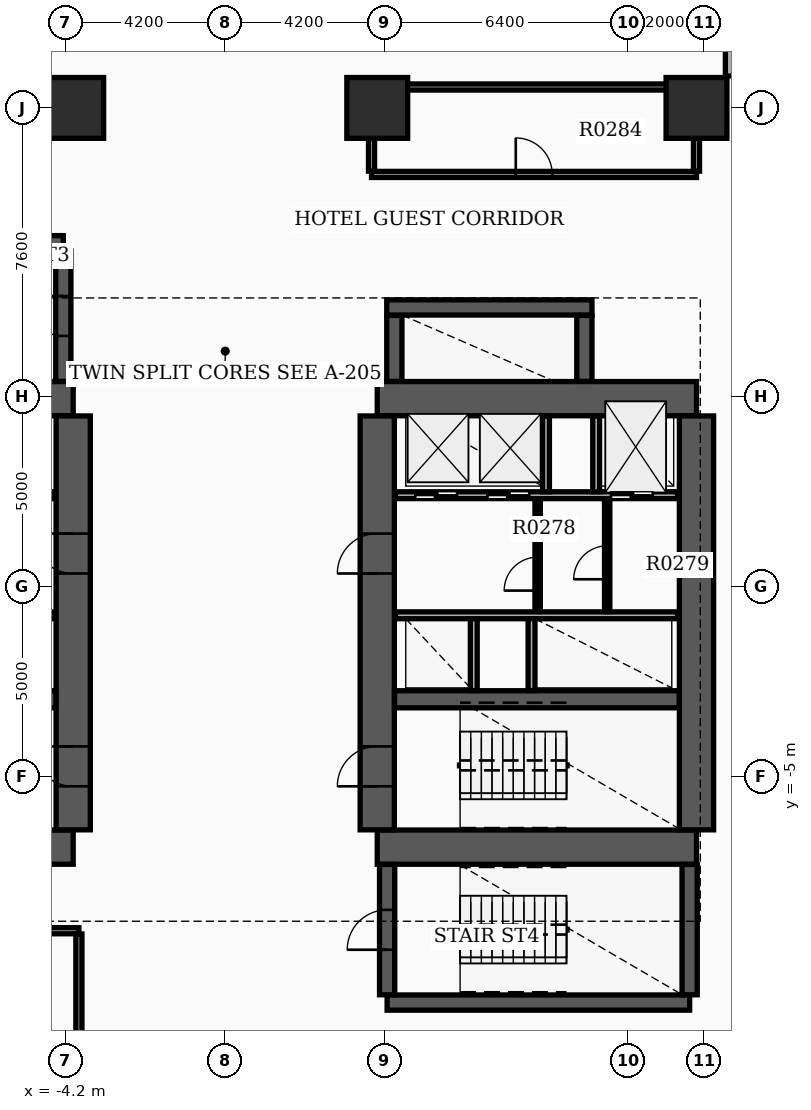
"""IFC4 building model, lengths in metres.
Left out: names, types, materials, properties, quantities, classifications, styles, units other than length and angle.
Written with IfcOpenShell. Run it as: python <this file> out.ifc"""

import sys

from ifc_helpers import new_model, si_unit, direction, frame, frame_2d, origin, origin_2d, place, context, subcontext, project, spatial, rectangle, extrude, element, fill, save


model = new_model("IFC4")
c1 = context("Model", 3, precision=1e-05, world=origin(), true_north=direction((0.0, 1.0)))
c2 = subcontext(c1, "Body", "Model", "MODEL_VIEW")
j1 = project(units=[si_unit("LENGTHUNIT", "METRE"), si_unit("PLANEANGLEUNIT", "RADIAN")], contexts=[c1])
p1 = place(None, origin())
s1 = spatial("IfcSite", under=j1, at=p1, CompositionType="ELEMENT")
p2 = place(p1, origin())
s2 = spatial("IfcBuilding", under=s1, at=p2, CompositionType="ELEMENT")
p3 = place(p2, frame((0.0, 0.0, 23.7)))
s3 = spatial("IfcBuildingStorey", under=s2, at=p3, CompositionType="ELEMENT", Elevation=23.7)
for number, where, z_axis, x_axis in (
    (1, (-12.4, -6.85, 0.0), (0.0, 0.0, 1.0), (1.0, 0.0, 0.0)),
    (2, (-12.4, 4.95, 0.0), (0.0, 0.0, 1.0), (1.0, 0.0, 0.0)),
):
    element("IfcWall", number, at=place(p3, frame(where, z_axis=z_axis, x_axis=x_axis)), inside=s3, PredefinedType="SHEAR", context=c2, shape_type="SweptSolid", body=[
        extrude(rectangle(XDim=8.4, YDim=0.9, at=frame_2d((4.2, 0.0))), origin(), (0.0, 0.0, 1.0), 3.7),
    ])
p4 = place(p3, frame((-4.0, -6.395, 0.0), z_axis=(0.0, 0.0, 1.0), x_axis=(0.0, 1.0, 0.0)))
e3 = element("IfcWall", 3, at=p4, inside=s3, PredefinedType="SHEAR", context=c2, shape_type="SweptSolid", body=[
    extrude(rectangle(XDim=10.89, YDim=0.9, at=frame_2d((5.445, 0.0))), origin(), (0.0, 0.0, 1.0), 3.7),
])
p5 = place(p4, frame((1.145, 0.0, 0.0)))
e4 = element("IfcOpeningElement", 4, at=p5, cuts=e3, PredefinedType="OPENING", context=c2, shape_type="SweptSolid", body=[
    extrude(rectangle(XDim=1.05, YDim=2.15, at=frame_2d((0.525, 1.075))), frame((0.0, 0.46, 0.0), z_axis=(0.0, -1.0, 0.0), x_axis=(1.0, 0.0, 0.0)), (0.0, 0.0, 1.0), 0.92),
])
p6 = place(p4, frame((6.745, 0.0, 0.0)))
e5 = element("IfcOpeningElement", 5, at=p6, cuts=e3, PredefinedType="OPENING", context=c2, shape_type="SweptSolid", body=[
    extrude(rectangle(XDim=1.05, YDim=2.15, at=frame_2d((0.525, 1.075))), frame((0.0, 0.46, 0.0), z_axis=(0.0, -1.0, 0.0), x_axis=(1.0, 0.0, 0.0)), (0.0, 0.0, 1.0), 0.92),
])
p7 = place(p3, frame((-11.945, -2.96, 0.0), z_axis=(0.0, 0.0, 1.0), x_axis=(1.0, 0.0, 0.0)))
e6 = element("IfcWall", 6, at=p7, inside=s3, PredefinedType="SHEAR", context=c2, shape_type="SweptSolid", body=[
    extrude(rectangle(XDim=7.49, YDim=0.45, at=frame_2d((3.745, 0.0))), origin(), (0.0, 0.0, 1.0), 3.7),
])
for number, where, z_axis, x_axis in (
    (7, (4.0, -6.85, 0.0), (0.0, 0.0, 1.0), (1.0, 0.0, 0.0)),
    (8, (4.0, 4.95, 0.0), (0.0, 0.0, 1.0), (1.0, 0.0, 0.0)),
):
    element("IfcWall", number, at=place(p3, frame(where, z_axis=z_axis, x_axis=x_axis)), inside=s3, PredefinedType="SHEAR", context=c2, shape_type="SweptSolid", body=[
        extrude(rectangle(XDim=8.4, YDim=0.9, at=frame_2d((4.2, 0.0))), origin(), (0.0, 0.0, 1.0), 3.7),
    ])
p8 = place(p3, frame((4.0, -6.395, 0.0), z_axis=(0.0, 0.0, 1.0), x_axis=(0.0, 1.0, 0.0)))
e9 = element("IfcWall", 9, at=p8, inside=s3, PredefinedType="SHEAR", context=c2, shape_type="SweptSolid", body=[
    extrude(rectangle(XDim=10.89, YDim=0.9, at=frame_2d((5.445, 0.0))), origin(), (0.0, 0.0, 1.0), 3.7),
])
p9 = place(p8, frame((1.145, 0.0, 0.0)))
e10 = element("IfcOpeningElement", 10, at=p9, cuts=e9, PredefinedType="OPENING", context=c2, shape_type="SweptSolid", body=[
    extrude(rectangle(XDim=1.05, YDim=2.15, at=frame_2d((0.525, 1.075))), frame((0.0, 0.46, 0.0), z_axis=(0.0, -1.0, 0.0), x_axis=(1.0, 0.0, 0.0)), (0.0, 0.0, 1.0), 0.92),
])
p10 = place(p8, frame((6.745, 0.0, 0.0)))
e11 = element("IfcOpeningElement", 11, at=p10, cuts=e9, PredefinedType="OPENING", context=c2, shape_type="SweptSolid", body=[
    extrude(rectangle(XDim=1.05, YDim=2.15, at=frame_2d((0.525, 1.075))), frame((0.0, 0.46, 0.0), z_axis=(0.0, -1.0, 0.0), x_axis=(1.0, 0.0, 0.0)), (0.0, 0.0, 1.0), 0.92),
])
p11 = place(p3, frame((12.4, -6.395, 0.0), z_axis=(0.0, 0.0, 1.0), x_axis=(0.0, 1.0, 0.0)))
e12 = element("IfcWall", 12, at=p11, inside=s3, PredefinedType="SHEAR", context=c2, shape_type="SweptSolid", body=[
    extrude(rectangle(XDim=10.89, YDim=0.9, at=frame_2d((5.445, 0.0))), origin(), (0.0, 0.0, 1.0), 3.7),
])
p12 = place(p3, frame((4.455, -2.96, 0.0), z_axis=(0.0, 0.0, 1.0), x_axis=(1.0, 0.0, 0.0)))
e13 = element("IfcWall", 13, at=p12, inside=s3, PredefinedType="SHEAR", context=c2, shape_type="SweptSolid", body=[
    extrude(rectangle(XDim=7.49, YDim=0.45, at=frame_2d((3.745, 0.0))), origin(), (0.0, 0.0, 1.0), 3.7),
])
p13 = place(p3, frame((-12.22, 9.04, 0.0), z_axis=(0.0, 0.0, 1.0), x_axis=(1.0, 0.0, 0.0)))
e14 = element("IfcWall", 14, at=p13, inside=s3, PredefinedType="SHEAR", context=c2, shape_type="SweptSolid", body=[
    extrude(rectangle(XDim=7.96, YDim=0.4, at=frame_2d((3.98, 0.0))), origin(), (0.0, 0.0, 1.0), 3.7),
])
p14 = place(p3, frame((-4.26, 5.405, 0.0), z_axis=(0.0, 0.0, 1.0), x_axis=(0.0, 1.0, 0.0)))
e15 = element("IfcWall", 15, at=p14, inside=s3, PredefinedType="SHEAR", context=c2, shape_type="SweptSolid", body=[
    extrude(rectangle(XDim=3.43, YDim=0.4, at=frame_2d((1.715, 0.0))), origin(), (0.0, 0.0, 1.0), 3.7),
])
p15 = place(p14, frame((1.195, 0.0, 0.0)))
e16 = element("IfcOpeningElement", 16, at=p15, cuts=e15, PredefinedType="OPENING", context=c2, shape_type="SweptSolid", body=[
    extrude(rectangle(XDim=1.05, YDim=2.15, at=frame_2d((0.525, 1.075))), frame((0.0, 0.21, 0.0), z_axis=(0.0, -1.0, 0.0), x_axis=(1.0, 0.0, 0.0)), (0.0, 0.0, 1.0), 0.42),
])
p16 = place(p3, frame((4.26, -10.94, 0.0), z_axis=(0.0, 0.0, 1.0), x_axis=(1.0, 0.0, 0.0)))
e17 = element("IfcWall", 17, at=p16, inside=s3, PredefinedType="SHEAR", context=c2, shape_type="SweptSolid", body=[
    extrude(rectangle(XDim=7.96, YDim=0.4, at=frame_2d((3.98, 0.0))), origin(), (0.0, 0.0, 1.0), 3.7),
])
p17 = place(p3, frame((4.26, -10.735, 0.0), z_axis=(0.0, 0.0, 1.0), x_axis=(0.0, 1.0, 0.0)))
e18 = element("IfcWall", 18, at=p17, inside=s3, PredefinedType="SHEAR", context=c2, shape_type="SweptSolid", body=[
    extrude(rectangle(XDim=3.43, YDim=0.4, at=frame_2d((1.715, 0.0))), origin(), (0.0, 0.0, 1.0), 3.7),
])
p18 = place(p17, frame((1.185, 0.0, 0.0)))
e19 = element("IfcOpeningElement", 19, at=p18, cuts=e18, PredefinedType="OPENING", context=c2, shape_type="SweptSolid", body=[
    extrude(rectangle(XDim=1.05, YDim=2.15, at=frame_2d((0.525, 1.075))), frame((0.0, 0.21, 0.0), z_axis=(0.0, -1.0, 0.0), x_axis=(1.0, 0.0, 0.0)), (0.0, 0.0, 1.0), 0.42),
])
p19 = place(p3, frame((12.22, -10.735, 0.0), z_axis=(0.0, 0.0, 1.0), x_axis=(0.0, 1.0, 0.0)))
e20 = element("IfcWall", 20, at=p19, inside=s3, PredefinedType="SHEAR", context=c2, shape_type="SweptSolid", body=[
    extrude(rectangle(XDim=3.43, YDim=0.4, at=frame_2d((1.715, 0.0))), origin(), (0.0, 0.0, 1.0), 3.7),
])
p20 = place(p3, frame((4.45, 5.405, 0.0), z_axis=(0.0, 0.0, 1.0), x_axis=(0.0, 1.0, 0.0)))
e21 = element("IfcWall", 21, at=p20, inside=s3, PredefinedType="SHEAR", context=c2, shape_type="SweptSolid", body=[
    extrude(rectangle(XDim=1.735, YDim=0.4, at=frame_2d((0.867, 0.0))), origin(), (0.0, 0.0, 1.0), 3.7),
])
p21 = place(p3, frame((4.25, 7.35, 0.0), z_axis=(0.0, 0.0, 1.0), x_axis=(1.0, 0.0, 0.0)))
e22 = element("IfcWall", 22, at=p21, inside=s3, PredefinedType="SHEAR", context=c2, shape_type="SweptSolid", body=[
    extrude(rectangle(XDim=5.4, YDim=0.4, at=frame_2d((2.7, 0.0))), origin(), (0.0, 0.0, 1.0), 3.7),
])
p22 = place(p3, frame((9.45, 5.405, 0.0), z_axis=(0.0, 0.0, 1.0), x_axis=(0.0, 1.0, 0.0)))
e23 = element("IfcWall", 23, at=p22, inside=s3, PredefinedType="SHEAR", context=c2, shape_type="SweptSolid", body=[
    extrude(rectangle(XDim=1.735, YDim=0.4, at=frame_2d((0.867, 0.0))), origin(), (0.0, 0.0, 1.0), 3.7),
])
for number, where, z_axis, x_axis in (
    (24, (12.4, 12.6, 0.0), (0.0, 0.0, 1.0), (1.0, 0.0, 0.0)),
    (25, (4.0, 12.6, 0.0), (0.0, 0.0, 1.0), (1.0, 0.0, 0.0)),
    (26, (-4.0, 12.6, 0.0), (0.0, 0.0, 1.0), (1.0, 0.0, 0.0)),
):
    element("IfcColumn", number, at=place(p3, frame(where, z_axis=z_axis, x_axis=x_axis)), inside=s3, PredefinedType="COLUMN", context=c2, shape_type="SweptSolid", body=[
        extrude(rectangle(XDim=1.6, YDim=1.6, at=origin_2d()), origin(), (0.0, 0.0, 1.0), 3.9),
    ])
p23 = place(p3, frame((13.3, 13.44, 0.0), z_axis=(0.0, 0.0, 1.0), x_axis=(0.0, 1.0, 0.0)))
e27 = element("IfcWall", 27, at=p23, inside=s3, PredefinedType="STANDARD", context=c2, shape_type="SweptSolid", body=[
    extrude(rectangle(XDim=1.5, YDim=0.28, at=frame_2d((0.75, 0.0))), origin(), (0.0, 0.0, 1.0), 2.91),
])
p24 = place(p3, frame((-11.9, 2.41, 0.0), z_axis=(0.0, 0.0, 1.0), x_axis=(1.0, 0.0, 0.0)))
e28 = element("IfcWall", 28, at=p24, inside=s3, PredefinedType="SOLIDWALL", context=c2, shape_type="SweptSolid", body=[
    extrude(rectangle(XDim=7.42, YDim=0.18, at=frame_2d((3.71, 0.0))), origin(), (0.0, 0.0, 1.0), 2.9),
])
p25 = place(p24, frame((0.55, 0.0, 0.0)))
e29 = element("IfcOpeningElement", 29, at=p25, cuts=e28, PredefinedType="OPENING", context=c2, shape_type="SweptSolid", body=[
    extrude(rectangle(XDim=1.1, YDim=2.15, at=frame_2d((0.55, 1.075))), frame((0.0, 0.1, 0.0), z_axis=(0.0, -1.0, 0.0), x_axis=(1.0, 0.0, 0.0)), (0.0, 0.0, 1.0), 0.2),
])
p26 = place(p24, frame((3.85, 0.0, 0.0)))
e30 = element("IfcOpeningElement", 30, at=p26, cuts=e28, PredefinedType="OPENING", context=c2, shape_type="SweptSolid", body=[
    extrude(rectangle(XDim=1.1, YDim=2.15, at=frame_2d((0.55, 1.075))), frame((0.0, 0.1, 0.0), z_axis=(0.0, -1.0, 0.0), x_axis=(1.0, 0.0, 0.0)), (0.0, 0.0, 1.0), 0.2),
])
p27 = place(p24, frame((5.75, 0.0, 0.0)))
e31 = element("IfcOpeningElement", 31, at=p27, cuts=e28, PredefinedType="OPENING", context=c2, shape_type="SweptSolid", body=[
    extrude(rectangle(XDim=1.1, YDim=2.15, at=frame_2d((0.55, 1.075))), frame((0.0, 0.1, 0.0), z_axis=(0.0, -1.0, 0.0), x_axis=(1.0, 0.0, 0.0)), (0.0, 0.0, 1.0), 0.2),
])
p28 = place(p3, frame((4.48, 2.41, 0.0), z_axis=(0.0, 0.0, 1.0), x_axis=(1.0, 0.0, 0.0)))
e32 = element("IfcWall", 32, at=p28, inside=s3, PredefinedType="SOLIDWALL", context=c2, shape_type="SweptSolid", body=[
    extrude(rectangle(XDim=7.42, YDim=0.18, at=frame_2d((3.71, 0.0))), origin(), (0.0, 0.0, 1.0), 2.9),
])
p29 = place(p28, frame((5.67, 0.0, 0.0)))
e33 = element("IfcOpeningElement", 33, at=p29, cuts=e32, PredefinedType="OPENING", context=c2, shape_type="SweptSolid", body=[
    extrude(rectangle(XDim=1.1, YDim=2.15, at=frame_2d((0.55, 1.075))), frame((0.0, 0.1, 0.0), z_axis=(0.0, -1.0, 0.0), x_axis=(1.0, 0.0, 0.0)), (0.0, 0.0, 1.0), 0.2),
])
p30 = place(p28, frame((0.52, 0.0, 0.0)))
e34 = element("IfcOpeningElement", 34, at=p30, cuts=e32, PredefinedType="OPENING", context=c2, shape_type="SweptSolid", body=[
    extrude(rectangle(XDim=1.1, YDim=2.15, at=frame_2d((0.55, 1.075))), frame((0.0, 0.1, 0.0), z_axis=(0.0, -1.0, 0.0), x_axis=(1.0, 0.0, 0.0)), (0.0, 0.0, 1.0), 0.2),
])
p31 = place(p28, frame((2.42, 0.0, 0.0)))
e35 = element("IfcOpeningElement", 35, at=p31, cuts=e32, PredefinedType="OPENING", context=c2, shape_type="SweptSolid", body=[
    extrude(rectangle(XDim=1.1, YDim=2.15, at=frame_2d((0.55, 1.075))), frame((0.0, 0.1, 0.0), z_axis=(0.0, -1.0, 0.0), x_axis=(1.0, 0.0, 0.0)), (0.0, 0.0, 1.0), 0.2),
])
for number, where, z_axis, x_axis in (
    (36, (-11.9, -0.75, 0.0), (0.0, 0.0, 1.0), (1.0, 0.0, 0.0)),
    (37, (4.48, -0.75, 0.0), (0.0, 0.0, 1.0), (1.0, 0.0, 0.0)),
):
    element("IfcWall", number, at=place(p3, frame(where, z_axis=z_axis, x_axis=x_axis)), inside=s3, PredefinedType="SOLIDWALL", context=c2, shape_type="SweptSolid", body=[
        extrude(rectangle(XDim=7.42, YDim=0.18, at=frame_2d((3.71, 0.0))), origin(), (0.0, 0.0, 1.0), 2.9),
    ])
for number, where, z_axis, x_axis in (
    (38, (8.44, 2.5, 0.0), (0.0, 0.0, 1.0), (0.0, 1.0, 0.0)),
    (39, (9.76, 2.5, 0.0), (0.0, 0.0, 1.0), (0.0, 1.0, 0.0)),
):
    element("IfcWall", number, at=place(p3, frame(where, z_axis=z_axis, x_axis=x_axis)), inside=s3, PredefinedType="SOLIDWALL", context=c2, shape_type="SweptSolid", body=[
        extrude(rectangle(XDim=1.99, YDim=0.18, at=frame_2d((0.995, 0.0))), origin(), (0.0, 0.0, 1.0), 2.9),
    ])
for number, where, z_axis, x_axis in (
    (40, (6.54, -2.73, 0.0), (0.0, 0.0, 1.0), (0.0, 1.0, 0.0)),
    (41, (8.06, -2.73, 0.0), (0.0, 0.0, 1.0), (0.0, 1.0, 0.0)),
):
    element("IfcWall", number, at=place(p3, frame(where, z_axis=z_axis, x_axis=x_axis)), inside=s3, PredefinedType="SOLIDWALL", context=c2, shape_type="SweptSolid", body=[
        extrude(rectangle(XDim=1.89, YDim=0.18, at=frame_2d((0.945, 0.0))), origin(), (0.0, 0.0, 1.0), 2.9),
    ])
p32 = place(p3, frame((8.22, -0.65, 0.0), z_axis=(0.0, 0.0, 1.0), x_axis=(0.0, 1.0, 0.0)))
e42 = element("IfcWall", 42, at=p32, inside=s3, PredefinedType="SOLIDWALL", context=c2, shape_type="SweptSolid", body=[
    extrude(rectangle(XDim=2.96, YDim=0.14, at=frame_2d((1.48, 0.0))), origin(), (0.0, 0.0, 1.0), 2.9),
])
p33 = place(p32, frame((0.55, 0.0, 0.0)))
e43 = element("IfcOpeningElement", 43, at=p33, cuts=e42, PredefinedType="OPENING", context=c2, shape_type="SweptSolid", body=[
    extrude(rectangle(XDim=0.88, YDim=2.1, at=frame_2d((0.44, 1.05))), frame((0.0, 0.08, 0.0), z_axis=(0.0, -1.0, 0.0), x_axis=(1.0, 0.0, 0.0)), (0.0, 0.0, 1.0), 0.16),
])
p34 = place(p3, frame((10.05, -0.652, 0.0), z_axis=(0.0, 0.0, 1.0), x_axis=(0.0, 1.0, 0.0)))
e44 = element("IfcWall", 44, at=p34, inside=s3, PredefinedType="PARTITIONING", context=c2, shape_type="SweptSolid", body=[
    extrude(rectangle(XDim=2.962, YDim=0.14, at=frame_2d((1.481, 0.0))), origin(), (0.0, 0.0, 1.0), 2.9),
])
p35 = place(p34, frame((0.85, 0.0, 0.0)))
e45 = element("IfcOpeningElement", 45, at=p35, cuts=e44, PredefinedType="OPENING", context=c2, shape_type="SweptSolid", body=[
    extrude(rectangle(XDim=0.88, YDim=2.1, at=frame_2d((0.44, 1.05))), frame((0.0, 0.08, 0.0), z_axis=(0.0, -1.0, 0.0), x_axis=(1.0, 0.0, 0.0)), (0.0, 0.0, 1.0), 0.16),
])
p36 = place(p3, frame((3.85, 10.85, 0.0), z_axis=(0.0, 0.0, 1.0), x_axis=(1.0, 0.0, 0.0)))
e46 = element("IfcWall", 46, at=p36, inside=s3, PredefinedType="PARTITIONING", context=c2, shape_type="SweptSolid", body=[
    extrude(rectangle(XDim=8.55, YDim=0.16, at=frame_2d((4.275, 0.0))), origin(), (0.0, 0.0, 1.0), 2.9),
])
p37 = place(p36, frame((3.795, 0.0, 0.0)))
e47 = element("IfcOpeningElement", 47, at=p37, cuts=e46, PredefinedType="OPENING", context=c2, shape_type="SweptSolid", body=[
    extrude(rectangle(XDim=0.96, YDim=2.15, at=frame_2d((0.48, 1.075))), frame((0.0, 0.09, 0.0), z_axis=(0.0, -1.0, 0.0), x_axis=(1.0, 0.0, 0.0)), (0.0, 0.0, 1.0), 0.18),
])
p38 = place(p3, frame((3.85, 13.15, 0.0), z_axis=(0.0, 0.0, 1.0), x_axis=(1.0, 0.0, 0.0)))
e48 = element("IfcWall", 48, at=p38, inside=s3, PredefinedType="PARTITIONING", context=c2, shape_type="SweptSolid", body=[
    extrude(rectangle(XDim=8.55, YDim=0.16, at=frame_2d((4.275, 0.0))), origin(), (0.0, 0.0, 1.0), 2.9),
])
for number, where, z_axis, x_axis in (
    (49, (3.85, 10.935, 0.0), (0.0, 0.0, 1.0), (0.0, 1.0, 0.0)),
    (50, (12.4, 10.935, 0.0), (0.0, 0.0, 1.0), (0.0, 1.0, 0.0)),
):
    element("IfcWall", number, at=place(p3, frame(where, z_axis=z_axis, x_axis=x_axis)), inside=s3, PredefinedType="PARTITIONING", context=c2, shape_type="SweptSolid", body=[
        extrude(rectangle(XDim=2.13, YDim=0.16, at=frame_2d((1.065, 0.0))), origin(), (0.0, 0.0, 1.0), 2.9),
    ])
p39 = place(p3, frame((-12.4, -9.05, 0.0), z_axis=(0.0, 0.0, 1.0), x_axis=(1.0, 0.0, 0.0)))
e51 = element("IfcWall", 51, at=p39, inside=s3, PredefinedType="PARTITIONING", context=c2, shape_type="SweptSolid", body=[
    extrude(rectangle(XDim=8.55, YDim=0.16, at=frame_2d((4.275, 0.0))), origin(), (0.0, 0.0, 1.0), 2.9),
])
p40 = place(p39, frame((3.795, 0.0, 0.0)))
e52 = element("IfcOpeningElement", 52, at=p40, cuts=e51, PredefinedType="OPENING", context=c2, shape_type="SweptSolid", body=[
    extrude(rectangle(XDim=0.96, YDim=2.15, at=frame_2d((0.48, 1.075))), frame((0.0, 0.09, 0.0), z_axis=(0.0, -1.0, 0.0), x_axis=(1.0, 0.0, 0.0)), (0.0, 0.0, 1.0), 0.18),
])
p41 = place(p3, frame((-3.85, -13.065, 0.0), z_axis=(0.0, 0.0, 1.0), x_axis=(0.0, 1.0, 0.0)))
e53 = element("IfcWall", 53, at=p41, inside=s3, PredefinedType="PARTITIONING", context=c2, shape_type="SweptSolid", body=[
    extrude(rectangle(XDim=3.93, YDim=0.16, at=frame_2d((1.965, 0.0))), origin(), (0.0, 0.0, 1.0), 2.9),
])
p42 = place(p5, origin())
e54 = element("IfcDoor", 54, at=p42, inside=s3, OperationType="SINGLE_SWING_RIGHT", PredefinedType="DOOR", context=c2, shape_type="SweptSolid", body=[
    extrude(rectangle(XDim=1.05, YDim=2.15, at=frame_2d((0.525, 1.075))), frame((0.0, 0.025, 0.0), z_axis=(0.0, -1.0, 0.0), x_axis=(1.0, 0.0, 0.0)), (0.0, 0.0, 1.0), 0.05),
])
fill(e4, e54)
p43 = place(p9, origin())
e55 = element("IfcDoor", 55, at=p43, inside=s3, OperationType="SINGLE_SWING_LEFT", PredefinedType="DOOR", context=c2, shape_type="SweptSolid", body=[
    extrude(rectangle(XDim=1.05, YDim=2.15, at=frame_2d((0.525, 1.075))), frame((0.0, 0.025, 0.0), z_axis=(0.0, -1.0, 0.0), x_axis=(1.0, 0.0, 0.0)), (0.0, 0.0, 1.0), 0.05),
])
fill(e10, e55)
p44 = place(p6, origin())
e56 = element("IfcDoor", 56, at=p44, inside=s3, OperationType="SINGLE_SWING_RIGHT", PredefinedType="DOOR", context=c2, shape_type="SweptSolid", body=[
    extrude(rectangle(XDim=1.05, YDim=2.15, at=frame_2d((0.525, 1.075))), frame((0.0, 0.025, 0.0), z_axis=(0.0, -1.0, 0.0), x_axis=(1.0, 0.0, 0.0)), (0.0, 0.0, 1.0), 0.05),
])
fill(e5, e56)
p45 = place(p10, origin())
e57 = element("IfcDoor", 57, at=p45, inside=s3, OperationType="SINGLE_SWING_LEFT", PredefinedType="DOOR", context=c2, shape_type="SweptSolid", body=[
    extrude(rectangle(XDim=1.05, YDim=2.15, at=frame_2d((0.525, 1.075))), frame((0.0, 0.025, 0.0), z_axis=(0.0, -1.0, 0.0), x_axis=(1.0, 0.0, 0.0)), (0.0, 0.0, 1.0), 0.05),
])
fill(e11, e57)
p46 = place(p15, origin())
e58 = element("IfcDoor", 58, at=p46, inside=s3, OperationType="SINGLE_SWING_RIGHT", PredefinedType="DOOR", context=c2, shape_type="SweptSolid", body=[
    extrude(rectangle(XDim=1.05, YDim=2.15, at=frame_2d((0.525, 1.075))), frame((0.0, 0.025, 0.0), z_axis=(0.0, -1.0, 0.0), x_axis=(1.0, 0.0, 0.0)), (0.0, 0.0, 1.0), 0.05),
])
fill(e16, e58)
p47 = place(p18, origin())
e59 = element("IfcDoor", 59, at=p47, inside=s3, OperationType="SINGLE_SWING_LEFT", PredefinedType="DOOR", context=c2, shape_type="SweptSolid", body=[
    extrude(rectangle(XDim=1.05, YDim=2.15, at=frame_2d((0.525, 1.075))), frame((0.0, 0.025, 0.0), z_axis=(0.0, -1.0, 0.0), x_axis=(1.0, 0.0, 0.0)), (0.0, 0.0, 1.0), 0.05),
])
fill(e19, e59)
p48 = place(p29, origin())
e60 = element("IfcDoor", 60, at=p48, inside=s3, OperationType="DOUBLE_DOOR_SLIDING", PredefinedType="DOOR", context=c2, shape_type="SweptSolid", body=[
    extrude(rectangle(XDim=1.1, YDim=2.15, at=frame_2d((0.55, 1.075))), frame((0.0, 0.025, 0.0), z_axis=(0.0, -1.0, 0.0), x_axis=(1.0, 0.0, 0.0)), (0.0, 0.0, 1.0), 0.05),
])
fill(e33, e60)
p49 = place(p30, origin())
e61 = element("IfcDoor", 61, at=p49, inside=s3, OperationType="DOUBLE_DOOR_SLIDING", PredefinedType="DOOR", context=c2, shape_type="SweptSolid", body=[
    extrude(rectangle(XDim=1.1, YDim=2.15, at=frame_2d((0.55, 1.075))), frame((0.0, 0.025, 0.0), z_axis=(0.0, -1.0, 0.0), x_axis=(1.0, 0.0, 0.0)), (0.0, 0.0, 1.0), 0.05),
])
fill(e34, e61)
p50 = place(p31, origin())
e62 = element("IfcDoor", 62, at=p50, inside=s3, OperationType="DOUBLE_DOOR_SLIDING", PredefinedType="DOOR", context=c2, shape_type="SweptSolid", body=[
    extrude(rectangle(XDim=1.1, YDim=2.15, at=frame_2d((0.55, 1.075))), frame((0.0, 0.025, 0.0), z_axis=(0.0, -1.0, 0.0), x_axis=(1.0, 0.0, 0.0)), (0.0, 0.0, 1.0), 0.05),
])
fill(e35, e62)
p51 = place(p33, origin())
e63 = element("IfcDoor", 63, at=p51, inside=s3, OperationType="SINGLE_SWING_LEFT", PredefinedType="DOOR", context=c2, shape_type="SweptSolid", body=[
    extrude(rectangle(XDim=0.88, YDim=2.1, at=frame_2d((0.44, 1.05))), frame((0.0, 0.025, 0.0), z_axis=(0.0, -1.0, 0.0), x_axis=(1.0, 0.0, 0.0)), (0.0, 0.0, 1.0), 0.05),
])
fill(e43, e63)
p52 = place(p35, origin())
e64 = element("IfcDoor", 64, at=p52, inside=s3, OperationType="SINGLE_SWING_LEFT", PredefinedType="DOOR", context=c2, shape_type="SweptSolid", body=[
    extrude(rectangle(XDim=0.88, YDim=2.1, at=frame_2d((0.44, 1.05))), frame((0.0, 0.025, 0.0), z_axis=(0.0, -1.0, 0.0), x_axis=(1.0, 0.0, 0.0)), (0.0, 0.0, 1.0), 0.05),
])
fill(e45, e64)
p53 = place(p37, origin())
e65 = element("IfcDoor", 65, at=p53, inside=s3, OperationType="SINGLE_SWING_LEFT", PredefinedType="DOOR", context=c2, shape_type="SweptSolid", body=[
    extrude(rectangle(XDim=0.96, YDim=2.15, at=frame_2d((0.48, 1.075))), frame((0.0, 0.025, 0.0), z_axis=(0.0, -1.0, 0.0), x_axis=(1.0, 0.0, 0.0)), (0.0, 0.0, 1.0), 0.05),
])
fill(e47, e65)
save(model, sys.argv[1])
